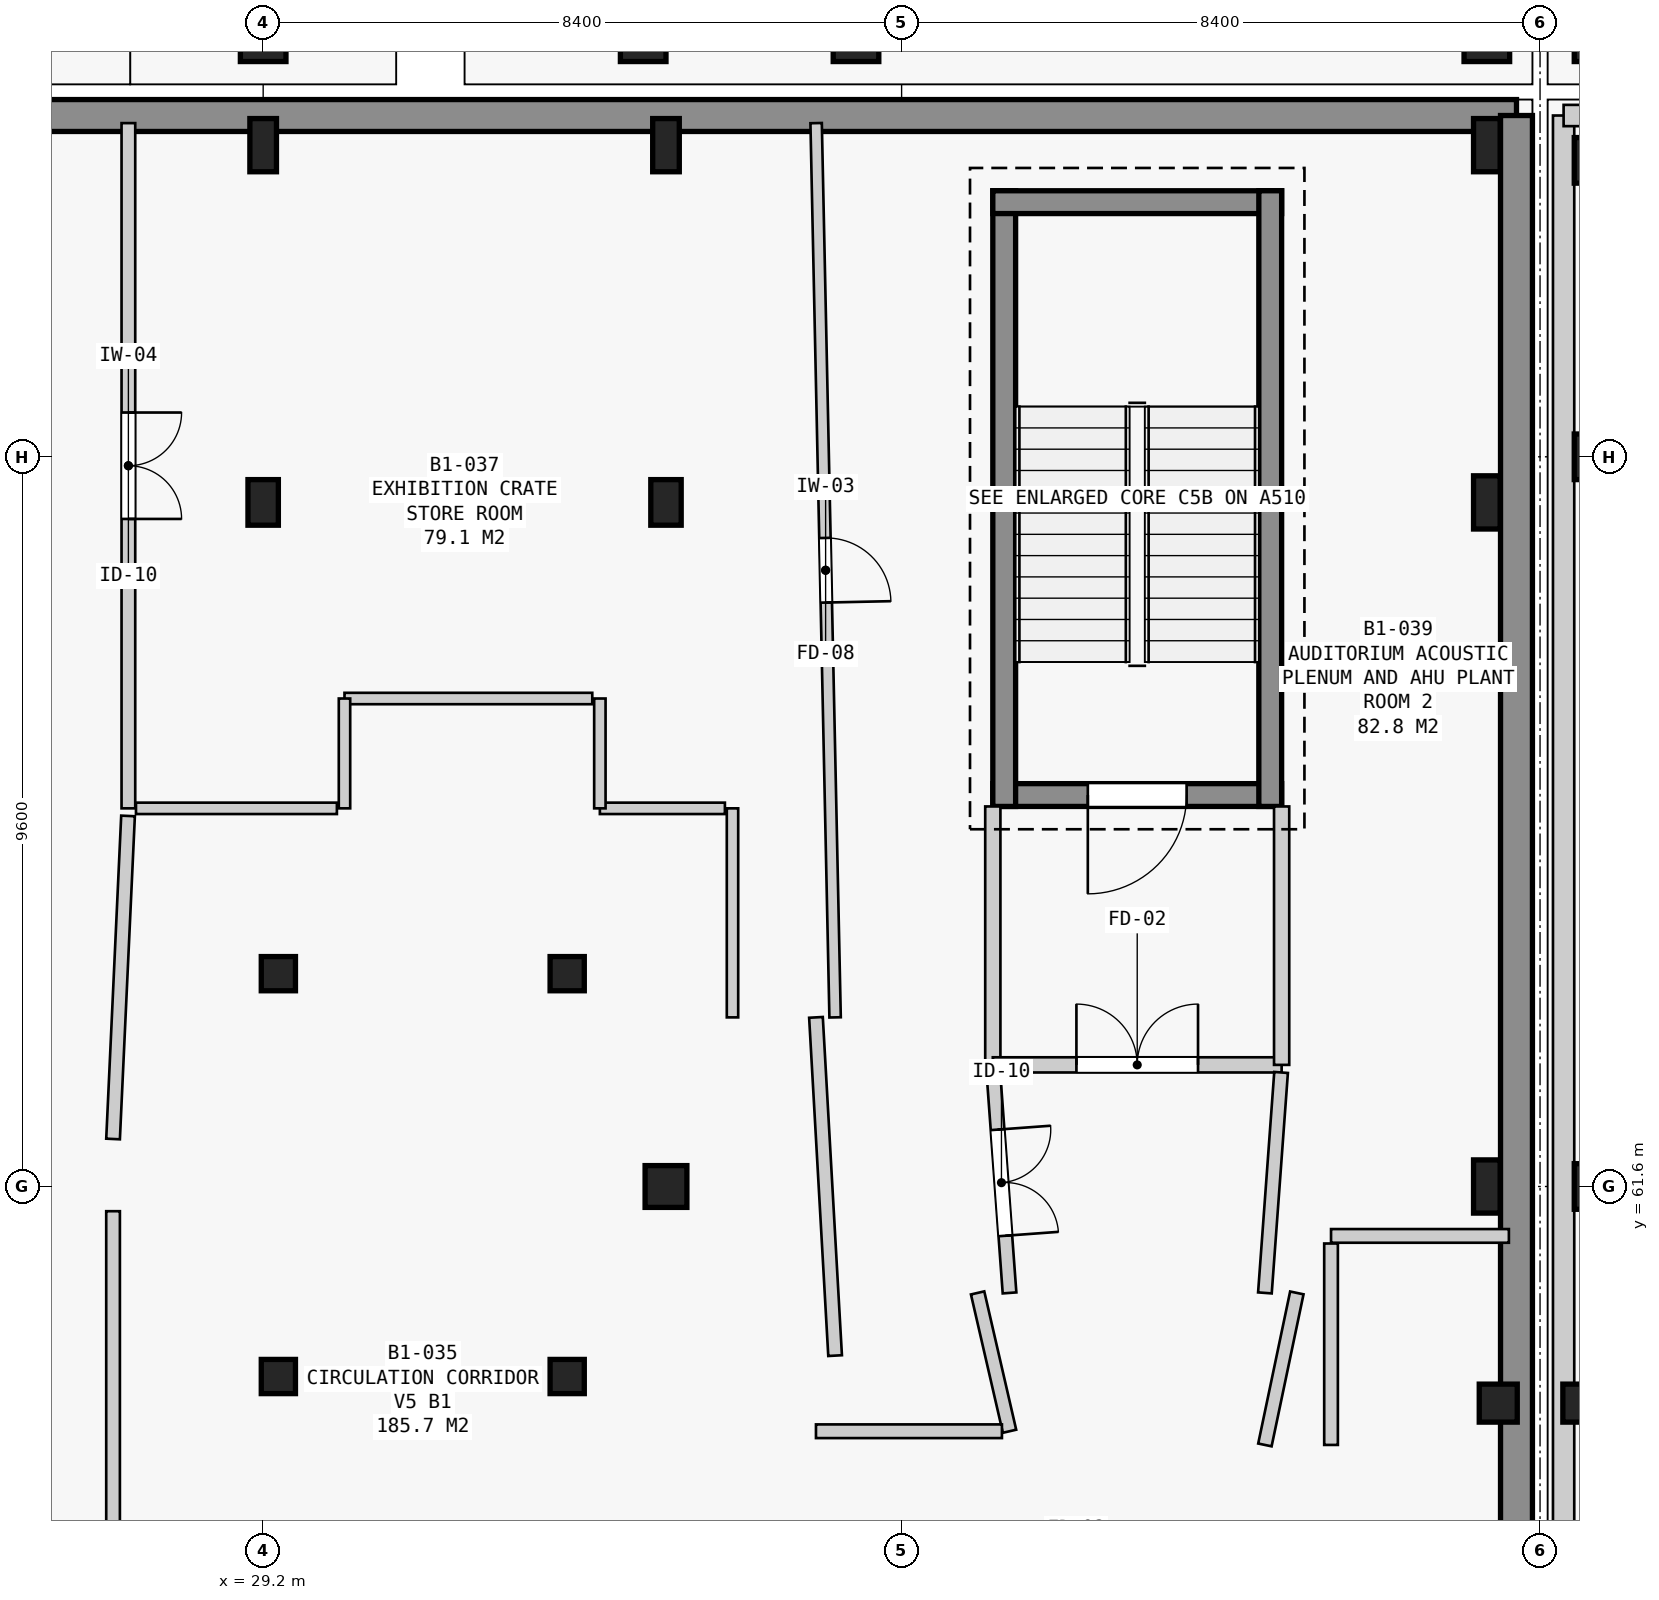
"""IFC4 building model, lengths in metres.
Left out: names, types, materials, properties, quantities, classifications, styles, units other than length and angle.
Written with IfcOpenShell. Run it as: python <this file> out.ifc"""

import sys

from ifc_helpers import new_model, si_unit, direction, frame, frame_2d, origin, origin_2d, place, context, subcontext, project, spatial, rectangle, extrude, element, fill, save


model = new_model("IFC4")
c1 = context("Model", 3, precision=1e-05, world=origin(), true_north=direction((0.0, 1.0)))
c2 = subcontext(c1, "Body", "Model", "MODEL_VIEW")
j1 = project(units=[si_unit("LENGTHUNIT", "METRE"), si_unit("PLANEANGLEUNIT", "RADIAN")], contexts=[c1])
p1 = place(None, origin())
s1 = spatial("IfcSite", under=j1, at=p1, CompositionType="ELEMENT")
p2 = place(p1, origin())
s2 = spatial("IfcBuilding", under=s1, at=p2, CompositionType="ELEMENT")
p3 = place(p2, frame((0.0, 0.0, -4.5)))
s3 = spatial("IfcBuildingStorey", under=s2, at=p3, CompositionType="ELEMENT", Elevation=-4.5)
p4 = place(p3, frame((29.2, 70.6, 0.0), z_axis=(0.0, 0.0, 1.0), x_axis=(1.0, 0.0, 0.0)))
e1 = element("IfcColumn", 1, at=p4, inside=s3, PredefinedType="COLUMN", context=c2, shape_type="SweptSolid", body=[
    extrude(rectangle(XDim=0.4, YDim=0.6, at=origin_2d()), origin(), (0.0, 0.0, 1.0), 4.5),
])
p5 = place(p3, frame((29.2, 75.3, 0.0), z_axis=(0.0, 0.0, 1.0), x_axis=(1.0, 0.0, 0.0)))
e2 = element("IfcColumn", 2, at=p5, inside=s3, PredefinedType="COLUMN", context=c2, shape_type="SweptSolid", body=[
    extrude(rectangle(XDim=0.35, YDim=0.7, at=origin_2d()), origin(), (0.0, 0.0, 1.0), 4.5),
])
p6 = place(p3, frame((34.5, 61.6, 0.0), z_axis=(0.0, 0.0, 1.0), x_axis=(1.0, 0.0, 0.0)))
e3 = element("IfcColumn", 3, at=p6, inside=s3, PredefinedType="COLUMN", context=c2, shape_type="SweptSolid", body=[
    extrude(rectangle(XDim=0.55, YDim=0.55, at=origin_2d()), origin(), (0.0, 0.0, 1.0), 4.5),
])
p7 = place(p3, frame((34.5, 70.6, 0.0), z_axis=(0.0, 0.0, 1.0), x_axis=(1.0, 0.0, 0.0)))
e4 = element("IfcColumn", 4, at=p7, inside=s3, PredefinedType="COLUMN", context=c2, shape_type="SweptSolid", body=[
    extrude(rectangle(XDim=0.4, YDim=0.6, at=origin_2d()), origin(), (0.0, 0.0, 1.0), 4.5),
])
for number, where, z_axis, x_axis in (
    (5, (34.5, 75.3, 0.0), (0.0, 0.0, 1.0), (1.0, 0.0, 0.0)),
    (6, (45.3, 61.6, 0.0), (0.0, 0.0, 1.0), (1.0, 0.0, 0.0)),
    (7, (45.3, 70.6, 0.0), (0.0, 0.0, 1.0), (1.0, 0.0, 0.0)),
    (8, (45.3, 75.3, 0.0), (0.0, 0.0, 1.0), (1.0, 0.0, 0.0)),
):
    element("IfcColumn", number, at=place(p3, frame(where, z_axis=z_axis, x_axis=x_axis)), inside=s3, PredefinedType="COLUMN", context=c2, shape_type="SweptSolid", body=[
        extrude(rectangle(XDim=0.35, YDim=0.7, at=origin_2d()), origin(), (0.0, 0.0, 1.0), 4.5),
    ])
for number, where, z_axis, x_axis in (
    (9, (29.4, 59.1, 0.0), (0.0, 0.0, 1.0), (1.0, 0.0, 0.0)),
    (10, (33.2, 59.1, 0.0), (0.0, 0.0, 1.0), (1.0, 0.0, 0.0)),
    (11, (29.4, 64.4, 0.0), (0.0, 0.0, 1.0), (1.0, 0.0, 0.0)),
    (12, (33.2, 64.4, 0.0), (0.0, 0.0, 1.0), (1.0, 0.0, 0.0)),
):
    element("IfcColumn", number, at=place(p3, frame(where, z_axis=z_axis, x_axis=x_axis)), inside=s3, PredefinedType="COLUMN", context=c2, shape_type="SweptSolid", body=[
        extrude(rectangle(XDim=0.45, YDim=0.45, at=origin_2d()), origin(), (0.0, 0.0, 1.0), 4.5),
    ])
for number, where, z_axis, x_axis in (
    (13, (45.45, 58.75, 0.0), (0.0, 0.0, 1.0), (1.0, 0.0, 0.0)),
    (14, (46.55, 58.75, 0.0), (0.0, 0.0, 1.0), (1.0, 0.0, 0.0)),
):
    element("IfcColumn", number, at=place(p3, frame(where, z_axis=z_axis, x_axis=x_axis)), inside=s3, PredefinedType="COLUMN", context=c2, shape_type="SweptSolid", body=[
        extrude(rectangle(XDim=0.5, YDim=0.5, at=origin_2d()), origin(), (0.0, 0.0, 1.0), 4.5),
    ])
for number, where, z_axis, x_axis in (
    (15, (46.75, 61.6, 0.0), (0.0, 0.0, 1.0), (1.0, 0.0, 0.0)),
    (16, (46.75, 71.2, 0.0), (0.0, 0.0, 1.0), (1.0, 0.0, 0.0)),
    (17, (46.75, 75.1, 0.0), (0.0, 0.0, 1.0), (1.0, 0.0, 0.0)),
    (18, (29.2, 76.7, 0.0), (0.0, 0.0, 1.0), (1.0, 0.0, 0.0)),
    (19, (34.2, 76.7, 0.0), (0.0, 0.0, 1.0), (1.0, 0.0, 0.0)),
    (20, (37.0, 76.7, 0.0), (0.0, 0.0, 1.0), (1.0, 0.0, 0.0)),
    (21, (45.3, 76.7, 0.0), (0.0, 0.0, 1.0), (1.0, 0.0, 0.0)),
    (22, (46.75, 76.7, 0.0), (0.0, 0.0, 1.0), (1.0, 0.0, 0.0)),
):
    element("IfcColumn", number, at=place(p3, frame(where, z_axis=z_axis, x_axis=x_axis)), inside=s3, PredefinedType="COLUMN", context=c2, shape_type="SweptSolid", body=[
        extrude(rectangle(XDim=0.6, YDim=0.6, at=origin_2d()), origin(), (0.0, 0.0, 1.0), 4.5),
    ])
p8 = place(p3, frame((46.31, 42.71, 0.0), z_axis=(0.0, 0.0, 1.0), x_axis=(0.0, 1.0, 0.0)))
e23 = element("IfcWall", 23, at=p8, inside=s3, PredefinedType="STANDARD", context=c2, shape_type="SweptSolid", body=[
    extrude(rectangle(XDim=32.98, YDim=0.28, at=frame_2d((16.49, 0.0))), origin(), (0.0, 0.0, 1.0), 4.1),
])
p9 = place(p3, frame((46.31, 75.69, 0.0), z_axis=(0.0, 0.0, 1.0), x_axis=(1.0, 0.0, 0.0)))
e24 = element("IfcWall", 24, at=p9, inside=s3, PredefinedType="STANDARD", context=c2, shape_type="SweptSolid", body=[
    extrude(rectangle(XDim=10.718, YDim=0.28, at=frame_2d((5.359, 0.0))), origin(), (0.0, 0.0, 1.0), 4.1),
])
p10 = place(p3, frame((18.21, 75.69, 0.0), z_axis=(0.0, 0.0, 1.0), x_axis=(1.0, 0.0, 0.0)))
e25 = element("IfcWall", 25, at=p10, inside=s3, PredefinedType="SOLIDWALL", context=c2, shape_type="SweptSolid", body=[
    extrude(rectangle(XDim=27.48, YDim=0.42, at=frame_2d((13.74, 0.0))), origin(), (0.0, 0.0, 1.0), 4.5),
])
p11 = place(p3, frame((45.69, 75.69, 0.0), z_axis=(0.0, 0.0, 1.0), x_axis=(0.0, -1.0, 0.0)))
e26 = element("IfcWall", 26, at=p11, inside=s3, PredefinedType="SOLIDWALL", context=c2, shape_type="SweptSolid", body=[
    extrude(rectangle(XDim=32.98, YDim=0.42, at=frame_2d((16.49, 0.0))), origin(), (0.0, 0.0, 1.0), 4.5),
])
p12 = place(p3, frame((42.6, 66.75, 0.0), z_axis=(0.0, 0.0, 1.0), x_axis=(-1.0, 0.0, 0.0)))
e27 = element("IfcWall", 27, at=p12, inside=s3, PredefinedType="SHEAR", context=c2, shape_type="SweptSolid", body=[
    extrude(rectangle(XDim=3.8, YDim=0.3, at=frame_2d((1.9, 0.0))), origin(), (0.0, 0.0, 1.0), 4.1),
])
p13 = place(p12, frame((1.25, 0.0, 0.0)))
e28 = element("IfcOpeningElement", 28, at=p13, cuts=e27, PredefinedType="OPENING", context=c2, shape_type="SweptSolid", body=[
    extrude(rectangle(XDim=1.3, YDim=2.2, at=frame_2d((0.65, 1.1))), frame((0.0, 0.16, 0.0), z_axis=(0.0, -1.0, 0.0), x_axis=(1.0, 0.0, 0.0)), (0.0, 0.0, 1.0), 0.32),
])
p14 = place(p3, frame((38.95, 66.6, 0.0), z_axis=(0.0, 0.0, 1.0), x_axis=(0.0, 1.0, 0.0)))
e29 = element("IfcWall", 29, at=p14, inside=s3, PredefinedType="SHEAR", context=c2, shape_type="SweptSolid", body=[
    extrude(rectangle(XDim=8.1, YDim=0.3, at=frame_2d((4.05, 0.0))), origin(), (0.0, 0.0, 1.0), 4.1),
])
p15 = place(p3, frame((38.8, 74.55, 0.0), z_axis=(0.0, 0.0, 1.0), x_axis=(1.0, 0.0, 0.0)))
e30 = element("IfcWall", 30, at=p15, inside=s3, PredefinedType="SHEAR", context=c2, shape_type="SweptSolid", body=[
    extrude(rectangle(XDim=3.8, YDim=0.3, at=frame_2d((1.9, 0.0))), origin(), (0.0, 0.0, 1.0), 4.1),
])
p16 = place(p3, frame((42.45, 74.7, 0.0), z_axis=(0.0, 0.0, 1.0), x_axis=(0.0, -1.0, 0.0)))
e31 = element("IfcWall", 31, at=p16, inside=s3, PredefinedType="SHEAR", context=c2, shape_type="SweptSolid", body=[
    extrude(rectangle(XDim=8.1, YDim=0.3, at=frame_2d((4.05, 0.0))), origin(), (0.0, 0.0, 1.0), 4.1),
])
p17 = place(p3, frame((38.8, 66.6, 0.0), z_axis=(0.0, 0.0, 1.0), x_axis=(0.0, -1.0, 0.0)))
e32 = element("IfcWall", 32, at=p17, inside=s3, PredefinedType="STANDARD", context=c2, shape_type="SweptSolid", body=[
    extrude(rectangle(XDim=3.4, YDim=0.2, at=frame_2d((1.7, 0.0))), origin(), (0.0, 0.0, 1.0), 4.1),
])
p18 = place(p3, frame((38.8, 63.2, 0.0), z_axis=(0.0, 0.0, 1.0), x_axis=(1.0, 0.0, 0.0)))
e33 = element("IfcWall", 33, at=p18, inside=s3, PredefinedType="STANDARD", context=c2, shape_type="SweptSolid", body=[
    extrude(rectangle(XDim=3.8, YDim=0.2, at=frame_2d((1.9, 0.0))), origin(), (0.0, 0.0, 1.0), 4.1),
])
p19 = place(p18, frame((1.1, 0.0, 0.0)))
e34 = element("IfcOpeningElement", 34, at=p19, cuts=e33, PredefinedType="OPENING", context=c2, shape_type="SweptSolid", body=[
    extrude(rectangle(XDim=1.6, YDim=2.2, at=frame_2d((0.8, 1.1))), frame((0.0, 0.11, 0.0), z_axis=(0.0, -1.0, 0.0), x_axis=(1.0, 0.0, 0.0)), (0.0, 0.0, 1.0), 0.22),
])
p20 = place(p3, frame((42.6, 63.2, 0.0), z_axis=(0.0, 0.0, 1.0), x_axis=(0.0, 1.0, 0.0)))
e35 = element("IfcWall", 35, at=p20, inside=s3, PredefinedType="STANDARD", context=c2, shape_type="SweptSolid", body=[
    extrude(rectangle(XDim=3.4, YDim=0.2, at=frame_2d((1.7, 0.0))), origin(), (0.0, 0.0, 1.0), 4.1),
])
p21 = place(p3, frame((27.427, 75.59, 0.0), z_axis=(0.0, 0.0, 1.0), x_axis=(0.0, -1.0, 0.0)))
e36 = element("IfcWall", 36, at=p21, inside=s3, PredefinedType="PARTITIONING", context=c2, shape_type="SweptSolid", body=[
    extrude(rectangle(XDim=9.015, YDim=0.18, at=frame_2d((4.508, 0.0))), origin(), (0.0, 0.0, 1.0), 3.28),
])
p22 = place(p21, frame((3.808, 0.0, 0.0)))
e37 = element("IfcOpeningElement", 37, at=p22, cuts=e36, PredefinedType="OPENING", context=c2, shape_type="SweptSolid", body=[
    extrude(rectangle(XDim=1.4, YDim=2.2, at=frame_2d((0.7, 1.1))), frame((0.0, 0.1, 0.0), z_axis=(0.0, -1.0, 0.0), x_axis=(1.0, 0.0, 0.0)), (0.0, 0.0, 1.0), 0.2),
])
p23 = place(p3, frame((27.422, 66.475, 0.0), z_axis=(0.0, 0.0, 1.0), x_axis=(-0.046308263322, -0.998927196921, 0.0)))
e38 = element("IfcWall", 38, at=p23, inside=s3, PredefinedType="PARTITIONING", context=c2, shape_type="SweptSolid", body=[
    extrude(rectangle(XDim=4.255, YDim=0.18, at=frame_2d((2.127, 0.0))), origin(), (0.0, 0.0, 1.0), 4.1),
])
p24 = place(p3, frame((27.225, 61.275, 0.0), z_axis=(0.0, 0.0, 1.0), x_axis=(0.0, -1.0, 0.0)))
e39 = element("IfcWall", 39, at=p24, inside=s3, PredefinedType="PARTITIONING", context=c2, shape_type="SweptSolid", body=[
    extrude(rectangle(XDim=4.35, YDim=0.18, at=frame_2d((2.175, 0.0))), origin(), (0.0, 0.0, 1.0), 4.1),
])
p25 = place(p3, frame((36.475, 75.59, 0.0), z_axis=(0.0, 0.0, 1.0), x_axis=(0.02122368897, -0.999774752145, 0.0)))
e40 = element("IfcWall", 40, at=p25, inside=s3, PredefinedType="PARTITIONING", context=c2, shape_type="SweptSolid", body=[
    extrude(rectangle(XDim=11.768, YDim=0.15, at=frame_2d((5.884, 0.0))), origin(), (0.0, 0.0, 1.0), 3.28),
])
p26 = place(p25, frame((5.459, 0.0, 0.0)))
e41 = element("IfcOpeningElement", 41, at=p26, cuts=e40, PredefinedType="OPENING", context=c2, shape_type="SweptSolid", body=[
    extrude(rectangle(XDim=0.85, YDim=2.1, at=frame_2d((0.425, 1.05))), frame((0.0, 0.085, 0.0), z_axis=(0.0, -1.0, 0.0), x_axis=(1.0, 0.0, 0.0)), (0.0, 0.0, 1.0), 0.17),
])
p27 = place(p3, frame((35.375, 63.825, 0.0), z_axis=(0.0, 0.0, 1.0), x_axis=(0.0, 1.0, 0.0)))
e42 = element("IfcWall", 42, at=p27, inside=s3, PredefinedType="PARTITIONING", context=c2, shape_type="SweptSolid", body=[
    extrude(rectangle(XDim=2.75, YDim=0.15, at=frame_2d((1.375, 0.0))), origin(), (0.0, 0.0, 1.0), 4.1),
])
p28 = place(p3, frame((35.275, 66.575, 0.0), z_axis=(0.0, 0.0, 1.0), x_axis=(-1.0, 0.0, 0.0)))
e43 = element("IfcWall", 43, at=p28, inside=s3, PredefinedType="PARTITIONING", context=c2, shape_type="SweptSolid", body=[
    extrude(rectangle(XDim=1.645, YDim=0.15, at=frame_2d((0.823, 0.0))), origin(), (0.0, 0.0, 1.0), 3.38),
])
p29 = place(p3, frame((33.63, 66.575, 0.0), z_axis=(0.0, 0.0, 1.0), x_axis=(0.0, 1.0, 0.0)))
e44 = element("IfcWall", 44, at=p29, inside=s3, PredefinedType="PARTITIONING", context=c2, shape_type="SweptSolid", body=[
    extrude(rectangle(XDim=1.445, YDim=0.15, at=frame_2d((0.723, 0.0))), origin(), (0.0, 0.0, 1.0), 4.1),
])
p30 = place(p3, frame((33.53, 68.02, 0.0), z_axis=(0.0, 0.0, 1.0), x_axis=(-1.0, 0.0, 0.0)))
e45 = element("IfcWall", 45, at=p30, inside=s3, PredefinedType="PARTITIONING", context=c2, shape_type="SweptSolid", body=[
    extrude(rectangle(XDim=3.26, YDim=0.15, at=frame_2d((1.63, 0.0))), origin(), (0.0, 0.0, 1.0), 4.1),
])
p31 = place(p3, frame((30.27, 68.02, 0.0), z_axis=(0.0, 0.0, 1.0), x_axis=(0.0, -1.0, 0.0)))
e46 = element("IfcWall", 46, at=p31, inside=s3, PredefinedType="PARTITIONING", context=c2, shape_type="SweptSolid", body=[
    extrude(rectangle(XDim=1.445, YDim=0.15, at=frame_2d((0.723, 0.0))), origin(), (0.0, 0.0, 1.0), 4.1),
])
p32 = place(p3, frame((30.17, 66.575, 0.0), z_axis=(0.0, 0.0, 1.0), x_axis=(-1.0, 0.0, 0.0)))
e47 = element("IfcWall", 47, at=p32, inside=s3, PredefinedType="PARTITIONING", context=c2, shape_type="SweptSolid", body=[
    extrude(rectangle(XDim=2.643, YDim=0.15, at=frame_2d((1.322, 0.0))), origin(), (0.0, 0.0, 1.0), 4.1),
])
p33 = place(p3, frame((45.59, 60.95, 0.0), z_axis=(0.0, 0.0, 1.0), x_axis=(-1.0, 0.0, 0.0)))
e48 = element("IfcWall", 48, at=p33, inside=s3, PredefinedType="PARTITIONING", context=c2, shape_type="SweptSolid", body=[
    extrude(rectangle(XDim=2.34, YDim=0.18, at=frame_2d((1.17, 0.0))), origin(), (0.0, 0.0, 1.0), 4.1),
])
p34 = place(p3, frame((43.25, 60.85, 0.0), z_axis=(0.0, 0.0, 1.0), x_axis=(0.0, -1.0, 0.0)))
e49 = element("IfcWall", 49, at=p34, inside=s3, PredefinedType="PARTITIONING", context=c2, shape_type="SweptSolid", body=[
    extrude(rectangle(XDim=2.65, YDim=0.18, at=frame_2d((1.325, 0.0))), origin(), (0.0, 0.0, 1.0), 4.1),
])
p35 = place(p3, frame((42.38, 58.2, 0.0), z_axis=(0.0, 0.0, 1.0), x_axis=(0.205595037036, 0.978637154795, 0.0)))
e50 = element("IfcWall", 50, at=p35, inside=s3, PredefinedType="PARTITIONING", context=c2, shape_type="SweptSolid", body=[
    extrude(rectangle(XDim=2.044, YDim=0.18, at=frame_2d((1.022, 0.0))), origin(), (0.0, 0.0, 1.0), 4.1),
])
p36 = place(p3, frame((42.38, 60.2, 0.0), z_axis=(0.0, 0.0, 1.0), x_axis=(0.073203739908, 0.997317007006, 0.0)))
e51 = element("IfcWall", 51, at=p36, inside=s3, PredefinedType="PARTITIONING", context=c2, shape_type="SweptSolid", body=[
    extrude(rectangle(XDim=2.908, YDim=0.18, at=frame_2d((1.454, 0.0))), origin(), (0.0, 0.0, 1.0), 3.38),
])
p37 = place(p3, frame((38.807, 63.1, 0.0), z_axis=(0.0, 0.0, 1.0), x_axis=(0.073120239762, -0.997323132459, 0.0)))
e52 = element("IfcWall", 52, at=p37, inside=s3, PredefinedType="PARTITIONING", context=c2, shape_type="SweptSolid", body=[
    extrude(rectangle(XDim=2.908, YDim=0.18, at=frame_2d((1.454, 0.0))), origin(), (0.0, 0.0, 1.0), 3.38),
])
p38 = place(p37, frame((0.754, 0.0, 0.0)))
e53 = element("IfcOpeningElement", 53, at=p38, cuts=e52, PredefinedType="OPENING", context=c2, shape_type="SweptSolid", body=[
    extrude(rectangle(XDim=1.4, YDim=2.2, at=frame_2d((0.7, 1.1))), frame((0.0, 0.1, 0.0), z_axis=(0.0, -1.0, 0.0), x_axis=(1.0, 0.0, 0.0)), (0.0, 0.0, 1.0), 0.2),
])
p39 = place(p3, frame((38.6, 60.2, 0.0), z_axis=(0.0, 0.0, 1.0), x_axis=(0.22481177725, -0.974402208952, 0.0)))
e54 = element("IfcWall", 54, at=p39, inside=s3, PredefinedType="PARTITIONING", context=c2, shape_type="SweptSolid", body=[
    extrude(rectangle(XDim=1.868, YDim=0.18, at=frame_2d((0.934, 0.0))), origin(), (0.0, 0.0, 1.0), 4.1),
])
p40 = place(p3, frame((38.92, 58.38, 0.0), z_axis=(0.0, 0.0, 1.0), x_axis=(-1.0, 0.0, 0.0)))
e55 = element("IfcWall", 55, at=p40, inside=s3, PredefinedType="PARTITIONING", context=c2, shape_type="SweptSolid", body=[
    extrude(rectangle(XDim=2.447, YDim=0.18, at=frame_2d((1.223, 0.0))), origin(), (0.0, 0.0, 1.0), 4.1),
])
p41 = place(p3, frame((36.725, 59.375, 0.0), z_axis=(0.0, 0.0, 1.0), x_axis=(-0.056474163975, 0.998404060891, 0.0)))
e56 = element("IfcWall", 56, at=p41, inside=s3, PredefinedType="PARTITIONING", context=c2, shape_type="SweptSolid", body=[
    extrude(rectangle(XDim=4.457, YDim=0.18, at=frame_2d((2.229, 0.0))), origin(), (0.0, 0.0, 1.0), 3.38),
])
p42 = place(p13, origin())
e57 = element("IfcDoor", 57, at=p42, inside=s3, OperationType="SINGLE_SWING_RIGHT", PredefinedType="DOOR", context=c2, shape_type="SweptSolid", body=[
    extrude(rectangle(XDim=1.3, YDim=2.2, at=frame_2d((0.65, 1.1))), frame((0.0, 0.025, 0.0), z_axis=(0.0, -1.0, 0.0), x_axis=(1.0, 0.0, 0.0)), (0.0, 0.0, 1.0), 0.05),
])
fill(e28, e57)
p43 = place(p19, origin())
e58 = element("IfcDoor", 58, at=p43, inside=s3, OperationType="DOUBLE_DOOR_SINGLE_SWING", PredefinedType="DOOR", context=c2, shape_type="SweptSolid", body=[
    extrude(rectangle(XDim=1.6, YDim=2.2, at=frame_2d((0.8, 1.1))), frame((0.0, 0.025, 0.0), z_axis=(0.0, -1.0, 0.0), x_axis=(1.0, 0.0, 0.0)), (0.0, 0.0, 1.0), 0.05),
])
fill(e34, e58)
p44 = place(p22, origin())
e59 = element("IfcDoor", 59, at=p44, inside=s3, OperationType="DOUBLE_DOOR_SINGLE_SWING", PredefinedType="DOOR", context=c2, shape_type="SweptSolid", body=[
    extrude(rectangle(XDim=1.4, YDim=2.2, at=frame_2d((0.7, 1.1))), frame((0.0, 0.025, 0.0), z_axis=(0.0, -1.0, 0.0), x_axis=(1.0, 0.0, 0.0)), (0.0, 0.0, 1.0), 0.05),
])
fill(e37, e59)
p45 = place(p26, origin())
e60 = element("IfcDoor", 60, at=p45, inside=s3, OperationType="SINGLE_SWING_RIGHT", PredefinedType="DOOR", context=c2, shape_type="SweptSolid", body=[
    extrude(rectangle(XDim=0.85, YDim=2.1, at=frame_2d((0.425, 1.05))), frame((0.0, 0.025, 0.0), z_axis=(0.0, -1.0, 0.0), x_axis=(1.0, 0.0, 0.0)), (0.0, 0.0, 1.0), 0.05),
])
fill(e41, e60)
p46 = place(p38, origin())
e61 = element("IfcDoor", 61, at=p46, inside=s3, OperationType="DOUBLE_DOOR_SINGLE_SWING", PredefinedType="DOOR", context=c2, shape_type="SweptSolid", body=[
    extrude(rectangle(XDim=1.4, YDim=2.2, at=frame_2d((0.7, 1.1))), frame((0.0, 0.025, 0.0), z_axis=(0.0, -1.0, 0.0), x_axis=(1.0, 0.0, 0.0)), (0.0, 0.0, 1.0), 0.05),
])
fill(e53, e61)
save(model, sys.argv[1])
